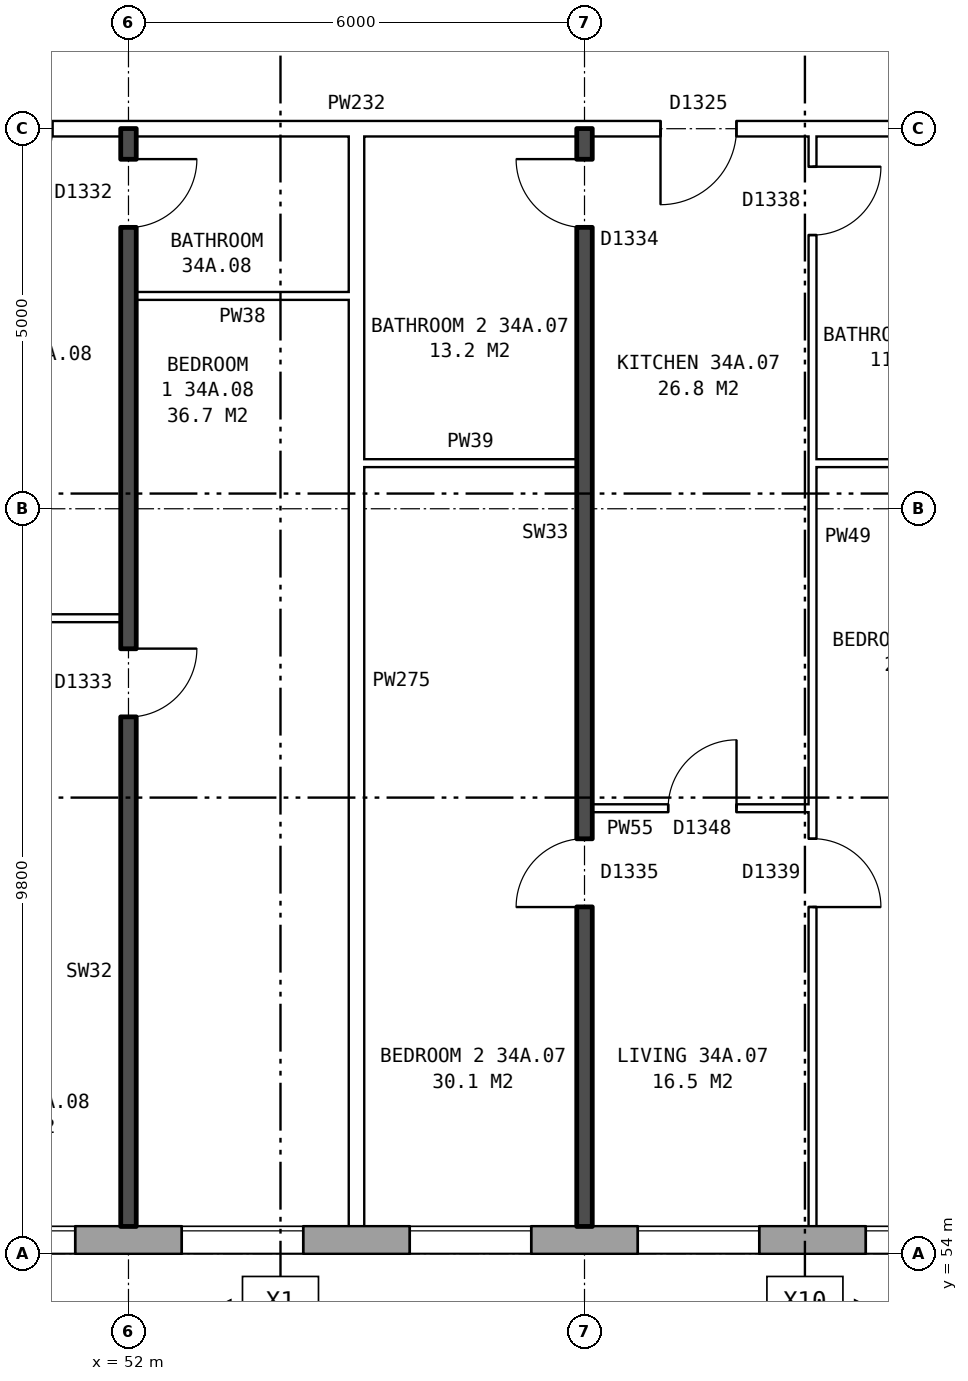
"""IFC4 building model, lengths in metres.
Left out: names, types, materials, properties, quantities, classifications, styles, units other than length and angle.
Written with IfcOpenShell. Run it as: python <this file> out.ifc"""

import sys

from ifc_helpers import new_model, si_unit, direction, frame, frame_2d, origin, place, context, subcontext, project, spatial, rectangle, extrude, element, fill, save


model = new_model("IFC4")
c1 = context("Model", 3, precision=1e-05, world=origin(), true_north=direction((0.0, 1.0)))
c2 = subcontext(c1, "Body", "Model", "MODEL_VIEW")
j1 = project(units=[si_unit("LENGTHUNIT", "METRE"), si_unit("PLANEANGLEUNIT", "RADIAN")], contexts=[c1])
p1 = place(None, origin())
s1 = spatial("IfcSite", under=j1, at=p1, CompositionType="ELEMENT")
p2 = place(p1, origin())
s2 = spatial("IfcBuilding", under=s1, at=p2, CompositionType="ELEMENT")
p3 = place(p2, frame((0.0, 0.0, 123.7)))
s3 = spatial("IfcBuildingStorey", under=s2, at=p3, CompositionType="ELEMENT", Elevation=123.7)
p4 = place(p3, frame((29.825, 54.18, 0.0), z_axis=(0.0, 0.0, 1.0), x_axis=(1.0, 0.0, 0.0)))
e1 = element("IfcWall", 1, at=p4, inside=s3, PredefinedType="STANDARD", context=c2, shape_type="SweptSolid", body=[
    extrude(rectangle(XDim=43.101, YDim=0.36, at=frame_2d((21.55, 0.0))), origin(), (0.0, 0.0, 1.0), 2.85),
])
p5 = place(p4, frame((0.3, 0.0, 0.8)))
e2 = element("IfcOpeningElement", 2, at=p5, cuts=e1, PredefinedType="OPENING", context=c2, shape_type="SweptSolid", body=[
    extrude(rectangle(XDim=1.6, YDim=1.8, at=frame_2d((0.8, 0.9))), frame((0.0, 0.19, 0.0), z_axis=(0.0, -1.0, 0.0), x_axis=(1.0, 0.0, 0.0)), (0.0, 0.0, 1.0), 0.38),
])
p6 = place(p4, frame((4.875, 0.0, 0.8)))
e3 = element("IfcOpeningElement", 3, at=p6, cuts=e1, PredefinedType="OPENING", context=c2, shape_type="SweptSolid", body=[
    extrude(rectangle(XDim=1.6, YDim=1.8, at=frame_2d((0.8, 0.9))), frame((0.0, 0.19, 0.0), z_axis=(0.0, -1.0, 0.0), x_axis=(1.0, 0.0, 0.0)), (0.0, 0.0, 1.0), 0.38),
])
p7 = place(p4, frame((7.875, 0.0, 0.8)))
e4 = element("IfcOpeningElement", 4, at=p7, cuts=e1, PredefinedType="OPENING", context=c2, shape_type="SweptSolid", body=[
    extrude(rectangle(XDim=1.6, YDim=1.8, at=frame_2d((0.8, 0.9))), frame((0.0, 0.19, 0.0), z_axis=(0.0, -1.0, 0.0), x_axis=(1.0, 0.0, 0.0)), (0.0, 0.0, 1.0), 0.38),
])
p8 = place(p4, frame((10.875, 0.0, 0.8)))
e5 = element("IfcOpeningElement", 5, at=p8, cuts=e1, PredefinedType="OPENING", context=c2, shape_type="SweptSolid", body=[
    extrude(rectangle(XDim=1.6, YDim=1.8, at=frame_2d((0.8, 0.9))), frame((0.0, 0.19, 0.0), z_axis=(0.0, -1.0, 0.0), x_axis=(1.0, 0.0, 0.0)), (0.0, 0.0, 1.0), 0.38),
])
p9 = place(p4, frame((13.875, 0.0, 0.8)))
e6 = element("IfcOpeningElement", 6, at=p9, cuts=e1, PredefinedType="OPENING", context=c2, shape_type="SweptSolid", body=[
    extrude(rectangle(XDim=1.6, YDim=1.8, at=frame_2d((0.8, 0.9))), frame((0.0, 0.19, 0.0), z_axis=(0.0, -1.0, 0.0), x_axis=(1.0, 0.0, 0.0)), (0.0, 0.0, 1.0), 0.38),
])
p10 = place(p4, frame((16.875, 0.0, 0.8)))
e7 = element("IfcOpeningElement", 7, at=p10, cuts=e1, PredefinedType="OPENING", context=c2, shape_type="SweptSolid", body=[
    extrude(rectangle(XDim=1.6, YDim=1.8, at=frame_2d((0.8, 0.9))), frame((0.0, 0.19, 0.0), z_axis=(0.0, -1.0, 0.0), x_axis=(1.0, 0.0, 0.0)), (0.0, 0.0, 1.0), 0.38),
])
p11 = place(p4, frame((19.875, 0.0, 0.8)))
e8 = element("IfcOpeningElement", 8, at=p11, cuts=e1, PredefinedType="OPENING", context=c2, shape_type="SweptSolid", body=[
    extrude(rectangle(XDim=1.6, YDim=1.8, at=frame_2d((0.8, 0.9))), frame((0.0, 0.19, 0.0), z_axis=(0.0, -1.0, 0.0), x_axis=(1.0, 0.0, 0.0)), (0.0, 0.0, 1.0), 0.38),
])
p12 = place(p4, frame((22.875, 0.0, 0.8)))
e9 = element("IfcOpeningElement", 9, at=p12, cuts=e1, PredefinedType="OPENING", context=c2, shape_type="SweptSolid", body=[
    extrude(rectangle(XDim=1.6, YDim=1.8, at=frame_2d((0.8, 0.9))), frame((0.0, 0.19, 0.0), z_axis=(0.0, -1.0, 0.0), x_axis=(1.0, 0.0, 0.0)), (0.0, 0.0, 1.0), 0.38),
])
p13 = place(p4, frame((25.875, 0.0, 0.8)))
e10 = element("IfcOpeningElement", 10, at=p13, cuts=e1, PredefinedType="OPENING", context=c2, shape_type="SweptSolid", body=[
    extrude(rectangle(XDim=1.6, YDim=1.8, at=frame_2d((0.8, 0.9))), frame((0.0, 0.19, 0.0), z_axis=(0.0, -1.0, 0.0), x_axis=(1.0, 0.0, 0.0)), (0.0, 0.0, 1.0), 0.38),
])
p14 = place(p4, frame((28.875, 0.0, 0.8)))
e11 = element("IfcOpeningElement", 11, at=p14, cuts=e1, PredefinedType="OPENING", context=c2, shape_type="SweptSolid", body=[
    extrude(rectangle(XDim=1.6, YDim=1.8, at=frame_2d((0.8, 0.9))), frame((0.0, 0.19, 0.0), z_axis=(0.0, -1.0, 0.0), x_axis=(1.0, 0.0, 0.0)), (0.0, 0.0, 1.0), 0.38),
])
p15 = place(p4, frame((31.875, 0.0, 0.8)))
e12 = element("IfcOpeningElement", 12, at=p15, cuts=e1, PredefinedType="OPENING", context=c2, shape_type="SweptSolid", body=[
    extrude(rectangle(XDim=1.6, YDim=1.8, at=frame_2d((0.8, 0.9))), frame((0.0, 0.19, 0.0), z_axis=(0.0, -1.0, 0.0), x_axis=(1.0, 0.0, 0.0)), (0.0, 0.0, 1.0), 0.38),
])
p16 = place(p4, frame((34.875, 0.0, 0.8)))
e13 = element("IfcOpeningElement", 13, at=p16, cuts=e1, PredefinedType="OPENING", context=c2, shape_type="SweptSolid", body=[
    extrude(rectangle(XDim=1.6, YDim=1.8, at=frame_2d((0.8, 0.9))), frame((0.0, 0.19, 0.0), z_axis=(0.0, -1.0, 0.0), x_axis=(1.0, 0.0, 0.0)), (0.0, 0.0, 1.0), 0.38),
])
p17 = place(p4, frame((36.775, 0.0, 0.8)))
e14 = element("IfcOpeningElement", 14, at=p17, cuts=e1, PredefinedType="OPENING", context=c2, shape_type="SweptSolid", body=[
    extrude(rectangle(XDim=1.2, YDim=1.8, at=frame_2d((0.6, 0.9))), frame((0.0, 0.19, 0.0), z_axis=(0.0, -1.0, 0.0), x_axis=(1.0, 0.0, 0.0)), (0.0, 0.0, 1.0), 0.38),
])
p18 = place(p4, frame((40.875, 0.0, 0.8)))
e15 = element("IfcOpeningElement", 15, at=p18, cuts=e1, PredefinedType="OPENING", context=c2, shape_type="SweptSolid", body=[
    extrude(rectangle(XDim=1.6, YDim=1.8, at=frame_2d((0.8, 0.9))), frame((0.0, 0.19, 0.0), z_axis=(0.0, -1.0, 0.0), x_axis=(1.0, 0.0, 0.0)), (0.0, 0.0, 1.0), 0.38),
])
p19 = place(p4, frame((2.2, 0.0, 1.7)))
e16 = element("IfcOpeningElement", 16, at=p19, cuts=e1, PredefinedType="OPENING", context=c2, shape_type="SweptSolid", body=[
    extrude(rectangle(XDim=0.8, YDim=0.9, at=frame_2d((0.4, 0.45))), frame((0.0, 0.19, 0.0), z_axis=(0.0, -1.0, 0.0), x_axis=(1.0, 0.0, 0.0)), (0.0, 0.0, 1.0), 0.38),
])
p20 = place(p4, frame((38.275, 0.0, 0.8)))
e17 = element("IfcOpeningElement", 17, at=p20, cuts=e1, PredefinedType="OPENING", context=c2, shape_type="SweptSolid", body=[
    extrude(rectangle(XDim=0.6, YDim=0.9, at=frame_2d((0.3, 0.45))), frame((0.0, 0.19, 0.0), z_axis=(0.0, -1.0, 0.0), x_axis=(1.0, 0.0, 0.0)), (0.0, 0.0, 1.0), 0.38),
])
p21 = place(p3, frame((58.1, 59.86, 0.0), z_axis=(0.0, 0.0, 1.0), x_axis=(1.0, 0.0, 0.0)))
e18 = element("IfcWall", 18, at=p21, inside=s3, PredefinedType="PARTITIONING", context=c2, shape_type="SweptSolid", body=[
    extrude(rectangle(XDim=2.9, YDim=0.1, at=frame_2d((1.45, 0.0))), origin(), (0.0, 0.0, 1.0), 2.85),
])
p22 = place(p21, frame((1.0, 0.0, 0.0)))
e19 = element("IfcOpeningElement", 19, at=p22, cuts=e18, PredefinedType="OPENING", context=c2, shape_type="SweptSolid", body=[
    extrude(rectangle(XDim=0.9, YDim=2.1, at=frame_2d((0.45, 1.05))), frame((0.0, 0.06, 0.0), z_axis=(0.0, -1.0, 0.0), x_axis=(1.0, 0.0, 0.0)), (0.0, 0.0, 1.0), 0.12),
])
p23 = place(p3, frame((49.0, 62.36, 0.0), z_axis=(0.0, 0.0, 1.0), x_axis=(1.0, 0.0, 0.0)))
e20 = element("IfcWall", 20, at=p23, inside=s3, PredefinedType="PARTITIONING", context=c2, shape_type="SweptSolid", body=[
    extrude(rectangle(XDim=2.9, YDim=0.1, at=frame_2d((1.45, 0.0))), origin(), (0.0, 0.0, 1.0), 2.85),
])
p24 = place(p23, frame((1.0, 0.0, 0.0)))
e21 = element("IfcOpeningElement", 21, at=p24, cuts=e20, PredefinedType="OPENING", context=c2, shape_type="SweptSolid", body=[
    extrude(rectangle(XDim=0.9, YDim=2.1, at=frame_2d((0.45, 1.05))), frame((0.0, 0.06, 0.0), z_axis=(0.0, -1.0, 0.0), x_axis=(1.0, 0.0, 0.0)), (0.0, 0.0, 1.0), 0.12),
])
p25 = place(p3, frame((55.1, 64.4, 0.0), z_axis=(0.0, 0.0, 1.0), x_axis=(1.0, 0.0, 0.0)))
e22 = element("IfcWall", 22, at=p25, inside=s3, PredefinedType="PARTITIONING", context=c2, shape_type="SweptSolid", body=[
    extrude(rectangle(XDim=2.8, YDim=0.1, at=frame_2d((1.4, 0.0))), origin(), (0.0, 0.0, 1.0), 2.85),
])
p26 = place(p3, frame((61.0, 64.4, 0.0), z_axis=(0.0, 0.0, 1.0), x_axis=(1.0, 0.0, 0.0)))
e23 = element("IfcWall", 23, at=p26, inside=s3, PredefinedType="PARTITIONING", context=c2, shape_type="SweptSolid", body=[
    extrude(rectangle(XDim=2.64, YDim=0.1, at=frame_2d((1.32, 0.0))), origin(), (0.0, 0.0, 1.0), 2.85),
])
p27 = place(p3, frame((52.1, 66.6, 0.0), z_axis=(0.0, 0.0, 1.0), x_axis=(1.0, 0.0, 0.0)))
e24 = element("IfcWall", 24, at=p27, inside=s3, PredefinedType="PARTITIONING", context=c2, shape_type="SweptSolid", body=[
    extrude(rectangle(XDim=2.8, YDim=0.1, at=frame_2d((1.4, 0.0))), origin(), (0.0, 0.0, 1.0), 2.85),
])
p28 = place(p3, frame((44.36, 68.8, 0.0), z_axis=(0.0, 0.0, 1.0), x_axis=(1.0, 0.0, 0.0)))
e25 = element("IfcWall", 25, at=p28, inside=s3, PredefinedType="PARTITIONING", context=c2, shape_type="SweptSolid", body=[
    extrude(rectangle(XDim=19.28, YDim=0.2, at=frame_2d((9.64, 0.0))), origin(), (0.0, 0.0, 1.0), 2.85),
])
p29 = place(p28, frame((14.64, 0.0, 0.0)))
e26 = element("IfcOpeningElement", 26, at=p29, cuts=e25, PredefinedType="OPENING", context=c2, shape_type="SweptSolid", body=[
    extrude(rectangle(XDim=1.0, YDim=2.1, at=frame_2d((0.5, 1.05))), frame((0.0, 0.11, 0.0), z_axis=(0.0, -1.0, 0.0), x_axis=(1.0, 0.0, 0.0)), (0.0, 0.0, 1.0), 0.22),
])
p30 = place(p28, frame((5.64, 0.0, 0.0)))
e27 = element("IfcOpeningElement", 27, at=p30, cuts=e25, PredefinedType="OPENING", context=c2, shape_type="SweptSolid", body=[
    extrude(rectangle(XDim=1.0, YDim=2.1, at=frame_2d((0.5, 1.05))), frame((0.0, 0.11, 0.0), z_axis=(0.0, -1.0, 0.0), x_axis=(1.0, 0.0, 0.0)), (0.0, 0.0, 1.0), 0.22),
])
p31 = place(p3, frame((52.0, 54.36, 0.0), z_axis=(0.0, 0.0, 1.0), x_axis=(0.0, 1.0, 0.0)))
e28 = element("IfcWall", 28, at=p31, inside=s3, PredefinedType="SOLIDWALL", context=c2, shape_type="SweptSolid", body=[
    extrude(rectangle(XDim=14.44, YDim=0.2, at=frame_2d((7.22, 0.0))), origin(), (0.0, 0.0, 1.0), 2.85),
])
p32 = place(p31, frame((6.7, 0.0, 0.0)))
e29 = element("IfcOpeningElement", 29, at=p32, cuts=e28, PredefinedType="OPENING", context=c2, shape_type="SweptSolid", body=[
    extrude(rectangle(XDim=0.9, YDim=2.1, at=frame_2d((0.45, 1.05))), frame((0.0, 0.11, 0.0), z_axis=(0.0, -1.0, 0.0), x_axis=(1.0, 0.0, 0.0)), (0.0, 0.0, 1.0), 0.22),
])
p33 = place(p31, frame((13.14, 0.0, 0.0)))
e30 = element("IfcOpeningElement", 30, at=p33, cuts=e28, PredefinedType="OPENING", context=c2, shape_type="SweptSolid", body=[
    extrude(rectangle(XDim=0.9, YDim=2.1, at=frame_2d((0.45, 1.05))), frame((0.0, 0.11, 0.0), z_axis=(0.0, -1.0, 0.0), x_axis=(1.0, 0.0, 0.0)), (0.0, 0.0, 1.0), 0.22),
])
p34 = place(p3, frame((55.0, 54.36, 0.0), z_axis=(0.0, 0.0, 1.0), x_axis=(0.0, 1.0, 0.0)))
e31 = element("IfcWall", 31, at=p34, inside=s3, PredefinedType="PARTITIONING", context=c2, shape_type="SweptSolid", body=[
    extrude(rectangle(XDim=14.34, YDim=0.2, at=frame_2d((7.17, 0.0))), origin(), (0.0, 0.0, 1.0), 2.85),
])
p35 = place(p3, frame((58.0, 54.36, 0.0), z_axis=(0.0, 0.0, 1.0), x_axis=(0.0, 1.0, 0.0)))
e32 = element("IfcWall", 32, at=p35, inside=s3, PredefinedType="SOLIDWALL", context=c2, shape_type="SweptSolid", body=[
    extrude(rectangle(XDim=14.44, YDim=0.2, at=frame_2d((7.22, 0.0))), origin(), (0.0, 0.0, 1.0), 2.85),
])
p36 = place(p35, frame((4.2, 0.0, 0.0)))
e33 = element("IfcOpeningElement", 33, at=p36, cuts=e32, PredefinedType="OPENING", context=c2, shape_type="SweptSolid", body=[
    extrude(rectangle(XDim=0.9, YDim=2.1, at=frame_2d((0.45, 1.05))), frame((0.0, 0.11, 0.0), z_axis=(0.0, -1.0, 0.0), x_axis=(1.0, 0.0, 0.0)), (0.0, 0.0, 1.0), 0.22),
])
p37 = place(p35, frame((13.14, 0.0, 0.0)))
e34 = element("IfcOpeningElement", 34, at=p37, cuts=e32, PredefinedType="OPENING", context=c2, shape_type="SweptSolid", body=[
    extrude(rectangle(XDim=0.9, YDim=2.1, at=frame_2d((0.45, 1.05))), frame((0.0, 0.11, 0.0), z_axis=(0.0, -1.0, 0.0), x_axis=(1.0, 0.0, 0.0)), (0.0, 0.0, 1.0), 0.22),
])
p38 = place(p3, frame((61.0, 54.36, 0.0), z_axis=(0.0, 0.0, 1.0), x_axis=(0.0, 1.0, 0.0)))
e35 = element("IfcWall", 35, at=p38, inside=s3, PredefinedType="PARTITIONING", context=c2, shape_type="SweptSolid", body=[
    extrude(rectangle(XDim=14.34, YDim=0.1, at=frame_2d((7.17, 0.0))), origin(), (0.0, 0.0, 1.0), 2.85),
])
p39 = place(p38, frame((4.2, 0.0, 0.0)))
e36 = element("IfcOpeningElement", 36, at=p39, cuts=e35, PredefinedType="OPENING", context=c2, shape_type="SweptSolid", body=[
    extrude(rectangle(XDim=0.9, YDim=2.1, at=frame_2d((0.45, 1.05))), frame((0.0, 0.06, 0.0), z_axis=(0.0, -1.0, 0.0), x_axis=(1.0, 0.0, 0.0)), (0.0, 0.0, 1.0), 0.12),
])
p40 = place(p38, frame((13.04, 0.0, 0.0)))
e37 = element("IfcOpeningElement", 37, at=p40, cuts=e35, PredefinedType="OPENING", context=c2, shape_type="SweptSolid", body=[
    extrude(rectangle(XDim=0.9, YDim=2.1, at=frame_2d((0.45, 1.05))), frame((0.0, 0.06, 0.0), z_axis=(0.0, -1.0, 0.0), x_axis=(1.0, 0.0, 0.0)), (0.0, 0.0, 1.0), 0.12),
])
p41 = place(p11, origin())
e38 = element("IfcWindow", 38, at=p41, inside=s3, PartitioningType="SINGLE_PANEL", PredefinedType="WINDOW", context=c2, shape_type="SweptSolid", body=[
    extrude(rectangle(XDim=1.6, YDim=1.8, at=frame_2d((0.8, 0.9))), frame((0.0, 0.15, 0.0), z_axis=(0.0, -1.0, 0.0), x_axis=(1.0, 0.0, 0.0)), (0.0, 0.0, 1.0), 0.06),
])
fill(e8, e38)
p42 = place(p12, origin())
e39 = element("IfcWindow", 39, at=p42, inside=s3, PartitioningType="SINGLE_PANEL", PredefinedType="WINDOW", context=c2, shape_type="SweptSolid", body=[
    extrude(rectangle(XDim=1.6, YDim=1.8, at=frame_2d((0.8, 0.9))), frame((0.0, 0.15, 0.0), z_axis=(0.0, -1.0, 0.0), x_axis=(1.0, 0.0, 0.0)), (0.0, 0.0, 1.0), 0.06),
])
fill(e9, e39)
p43 = place(p13, origin())
e40 = element("IfcWindow", 40, at=p43, inside=s3, PartitioningType="SINGLE_PANEL", PredefinedType="WINDOW", context=c2, shape_type="SweptSolid", body=[
    extrude(rectangle(XDim=1.6, YDim=1.8, at=frame_2d((0.8, 0.9))), frame((0.0, 0.15, 0.0), z_axis=(0.0, -1.0, 0.0), x_axis=(1.0, 0.0, 0.0)), (0.0, 0.0, 1.0), 0.06),
])
fill(e10, e40)
p44 = place(p14, origin())
e41 = element("IfcWindow", 41, at=p44, inside=s3, PartitioningType="SINGLE_PANEL", PredefinedType="WINDOW", context=c2, shape_type="SweptSolid", body=[
    extrude(rectangle(XDim=1.6, YDim=1.8, at=frame_2d((0.8, 0.9))), frame((0.0, 0.15, 0.0), z_axis=(0.0, -1.0, 0.0), x_axis=(1.0, 0.0, 0.0)), (0.0, 0.0, 1.0), 0.06),
])
fill(e11, e41)
p45 = place(p15, origin())
e42 = element("IfcWindow", 42, at=p45, inside=s3, PartitioningType="SINGLE_PANEL", PredefinedType="WINDOW", context=c2, shape_type="SweptSolid", body=[
    extrude(rectangle(XDim=1.6, YDim=1.8, at=frame_2d((0.8, 0.9))), frame((0.0, 0.15, 0.0), z_axis=(0.0, -1.0, 0.0), x_axis=(1.0, 0.0, 0.0)), (0.0, 0.0, 1.0), 0.06),
])
fill(e12, e42)
p46 = place(p39, frame((0.9, 0.0, 0.0), z_axis=(0.0, 0.0, 1.0), x_axis=(-1.0, 0.0, 0.0)))
e43 = element("IfcDoor", 43, at=p46, inside=s3, OperationType="SINGLE_SWING_RIGHT", PredefinedType="DOOR", context=c2, shape_type="SweptSolid", body=[
    extrude(rectangle(XDim=0.9, YDim=2.1, at=frame_2d((0.45, 1.05))), frame((0.0, 0.025, 0.0), z_axis=(0.0, -1.0, 0.0), x_axis=(1.0, 0.0, 0.0)), (0.0, 0.0, 1.0), 0.05),
])
fill(e36, e43)
p47 = place(p36, origin())
e44 = element("IfcDoor", 44, at=p47, inside=s3, OperationType="SINGLE_SWING_LEFT", PredefinedType="DOOR", context=c2, shape_type="SweptSolid", body=[
    extrude(rectangle(XDim=0.9, YDim=2.1, at=frame_2d((0.45, 1.05))), frame((0.0, 0.025, 0.0), z_axis=(0.0, -1.0, 0.0), x_axis=(1.0, 0.0, 0.0)), (0.0, 0.0, 1.0), 0.05),
])
fill(e33, e44)
p48 = place(p29, frame((1.0, 0.0, 0.0), z_axis=(0.0, 0.0, 1.0), x_axis=(-1.0, 0.0, 0.0)))
e45 = element("IfcDoor", 45, at=p48, inside=s3, OperationType="SINGLE_SWING_RIGHT", PredefinedType="DOOR", context=c2, shape_type="SweptSolid", body=[
    extrude(rectangle(XDim=1.0, YDim=2.1, at=frame_2d((0.5, 1.05))), frame((0.0, 0.025, 0.0), z_axis=(0.0, -1.0, 0.0), x_axis=(1.0, 0.0, 0.0)), (0.0, 0.0, 1.0), 0.05),
])
fill(e26, e45)
p49 = place(p22, origin())
e46 = element("IfcDoor", 46, at=p49, inside=s3, OperationType="SINGLE_SWING_RIGHT", PredefinedType="DOOR", context=c2, shape_type="SweptSolid", body=[
    extrude(rectangle(XDim=0.9, YDim=2.1, at=frame_2d((0.45, 1.05))), frame((0.0, 0.025, 0.0), z_axis=(0.0, -1.0, 0.0), x_axis=(1.0, 0.0, 0.0)), (0.0, 0.0, 1.0), 0.05),
])
fill(e19, e46)
p50 = place(p40, frame((0.9, 0.0, 0.0), z_axis=(0.0, 0.0, 1.0), x_axis=(-1.0, 0.0, 0.0)))
e47 = element("IfcDoor", 47, at=p50, inside=s3, OperationType="SINGLE_SWING_LEFT", PredefinedType="DOOR", context=c2, shape_type="SweptSolid", body=[
    extrude(rectangle(XDim=0.9, YDim=2.1, at=frame_2d((0.45, 1.05))), frame((0.0, 0.025, 0.0), z_axis=(0.0, -1.0, 0.0), x_axis=(1.0, 0.0, 0.0)), (0.0, 0.0, 1.0), 0.05),
])
fill(e37, e47)
p51 = place(p37, origin())
e48 = element("IfcDoor", 48, at=p51, inside=s3, OperationType="SINGLE_SWING_RIGHT", PredefinedType="DOOR", context=c2, shape_type="SweptSolid", body=[
    extrude(rectangle(XDim=0.9, YDim=2.1, at=frame_2d((0.45, 1.05))), frame((0.0, 0.025, 0.0), z_axis=(0.0, -1.0, 0.0), x_axis=(1.0, 0.0, 0.0)), (0.0, 0.0, 1.0), 0.05),
])
fill(e34, e48)
p52 = place(p32, frame((0.9, 0.0, 0.0), z_axis=(0.0, 0.0, 1.0), x_axis=(-1.0, 0.0, 0.0)))
e49 = element("IfcDoor", 49, at=p52, inside=s3, OperationType="SINGLE_SWING_LEFT", PredefinedType="DOOR", context=c2, shape_type="SweptSolid", body=[
    extrude(rectangle(XDim=0.9, YDim=2.1, at=frame_2d((0.45, 1.05))), frame((0.0, 0.025, 0.0), z_axis=(0.0, -1.0, 0.0), x_axis=(1.0, 0.0, 0.0)), (0.0, 0.0, 1.0), 0.05),
])
fill(e29, e49)
p53 = place(p33, frame((0.9, 0.0, 0.0), z_axis=(0.0, 0.0, 1.0), x_axis=(-1.0, 0.0, 0.0)))
e50 = element("IfcDoor", 50, at=p53, inside=s3, OperationType="SINGLE_SWING_LEFT", PredefinedType="DOOR", context=c2, shape_type="SweptSolid", body=[
    extrude(rectangle(XDim=0.9, YDim=2.1, at=frame_2d((0.45, 1.05))), frame((0.0, 0.025, 0.0), z_axis=(0.0, -1.0, 0.0), x_axis=(1.0, 0.0, 0.0)), (0.0, 0.0, 1.0), 0.05),
])
fill(e30, e50)
save(model, sys.argv[1])
